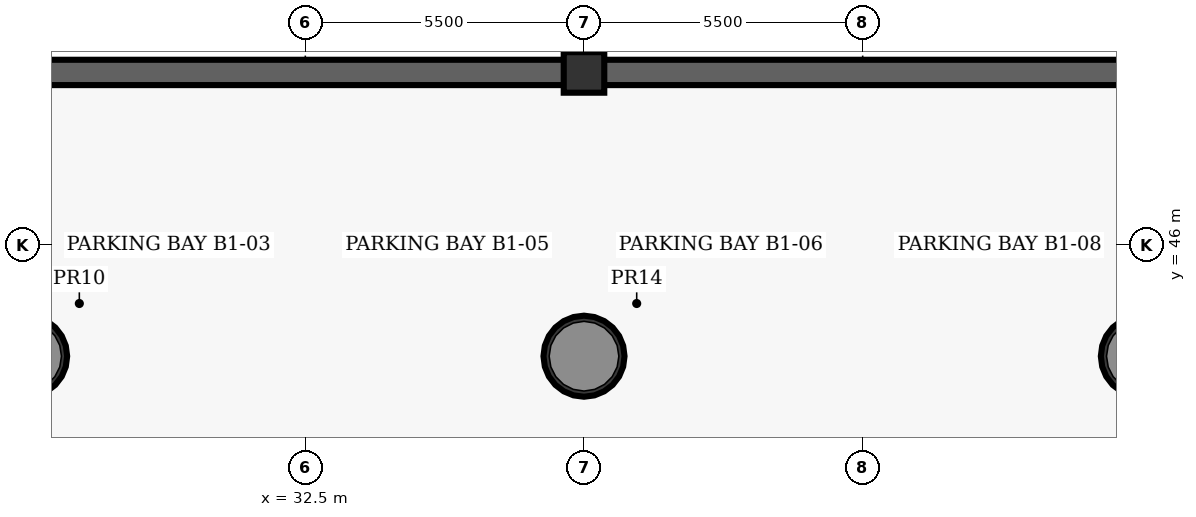
"""IFC4 building model, lengths in metres.
Left out: names, types, materials, properties, quantities, classifications, styles, units other than length and angle.
Written with IfcOpenShell. Run it as: python <this file> out.ifc"""

import sys

from ifc_helpers import new_model, si_unit, direction, frame, frame_2d, origin, origin_2d, place, context, subcontext, project, spatial, rectangle, hollow_circle, extrude, element, save


model = new_model("IFC4")
c1 = context("Model", 3, precision=1e-05, world=origin(), true_north=direction((0.0, 1.0)))
c2 = subcontext(c1, "Body", "Model", "MODEL_VIEW")
j1 = project(units=[si_unit("LENGTHUNIT", "METRE"), si_unit("PLANEANGLEUNIT", "RADIAN")], contexts=[c1])
p1 = place(None, origin())
s1 = spatial("IfcSite", under=j1, at=p1, CompositionType="ELEMENT")
p2 = place(p1, origin())
s2 = spatial("IfcBuilding", under=s1, at=p2, CompositionType="ELEMENT")
p3 = place(p2, frame((0.0, 0.0, -6.0)))
s3 = spatial("IfcBuildingStorey", under=s2, at=p3, CompositionType="ELEMENT", Elevation=-6.0)
for number, where, z_axis, x_axis in (
    (1, (0.25, 49.4, -0.45), (0.0, 0.0, 1.0), (1.0, 0.0, 0.0)),
    (2, (38.0, 49.4, -0.45), (0.0, 0.0, 1.0), (1.0, 0.0, 0.0)),
):
    element("IfcWall", number, at=place(p3, frame(where, z_axis=z_axis, x_axis=x_axis)), inside=s3, PredefinedType="USERDEFINED", context=c2, shape_type="SweptSolid", body=[
        extrude(rectangle(XDim=37.75, YDim=0.5, at=frame_2d((18.875, 0.0))), origin(), (0.0, 0.0, 1.0), 6.1),
    ])
p4 = place(p3, frame((38.0, 49.4, -0.45), z_axis=(0.0, 0.0, 1.0), x_axis=(1.0, 0.0, 0.0)))
e3 = element("IfcColumn", 3, at=p4, inside=s3, PredefinedType="COLUMN", context=c2, shape_type="SweptSolid", body=[
    extrude(rectangle(XDim=0.8, YDim=0.8, at=origin_2d()), origin(), (0.0, 0.0, 1.0), 6.45),
])
for number, where, z_axis, x_axis in (
    (4, (27.0, 43.8, -0.45), (0.0, 0.0, 1.0), (1.0, 0.0, 0.0)),
    (5, (38.0, 43.8, -0.45), (0.0, 0.0, 1.0), (1.0, 0.0, 0.0)),
    (6, (49.0, 43.8, -0.45), (0.0, 0.0, 1.0), (1.0, 0.0, 0.0)),
):
    element("IfcColumn", number, at=place(p3, frame(where, z_axis=z_axis, x_axis=x_axis)), inside=s3, PredefinedType="COLUMN", context=c2, shape_type="SweptSolid", body=[
        extrude(hollow_circle(Radius=0.8, WallThickness=0.06, at=origin_2d()), origin(), (0.0, 0.0, 1.0), 6.45),
    ])
save(model, sys.argv[1])
